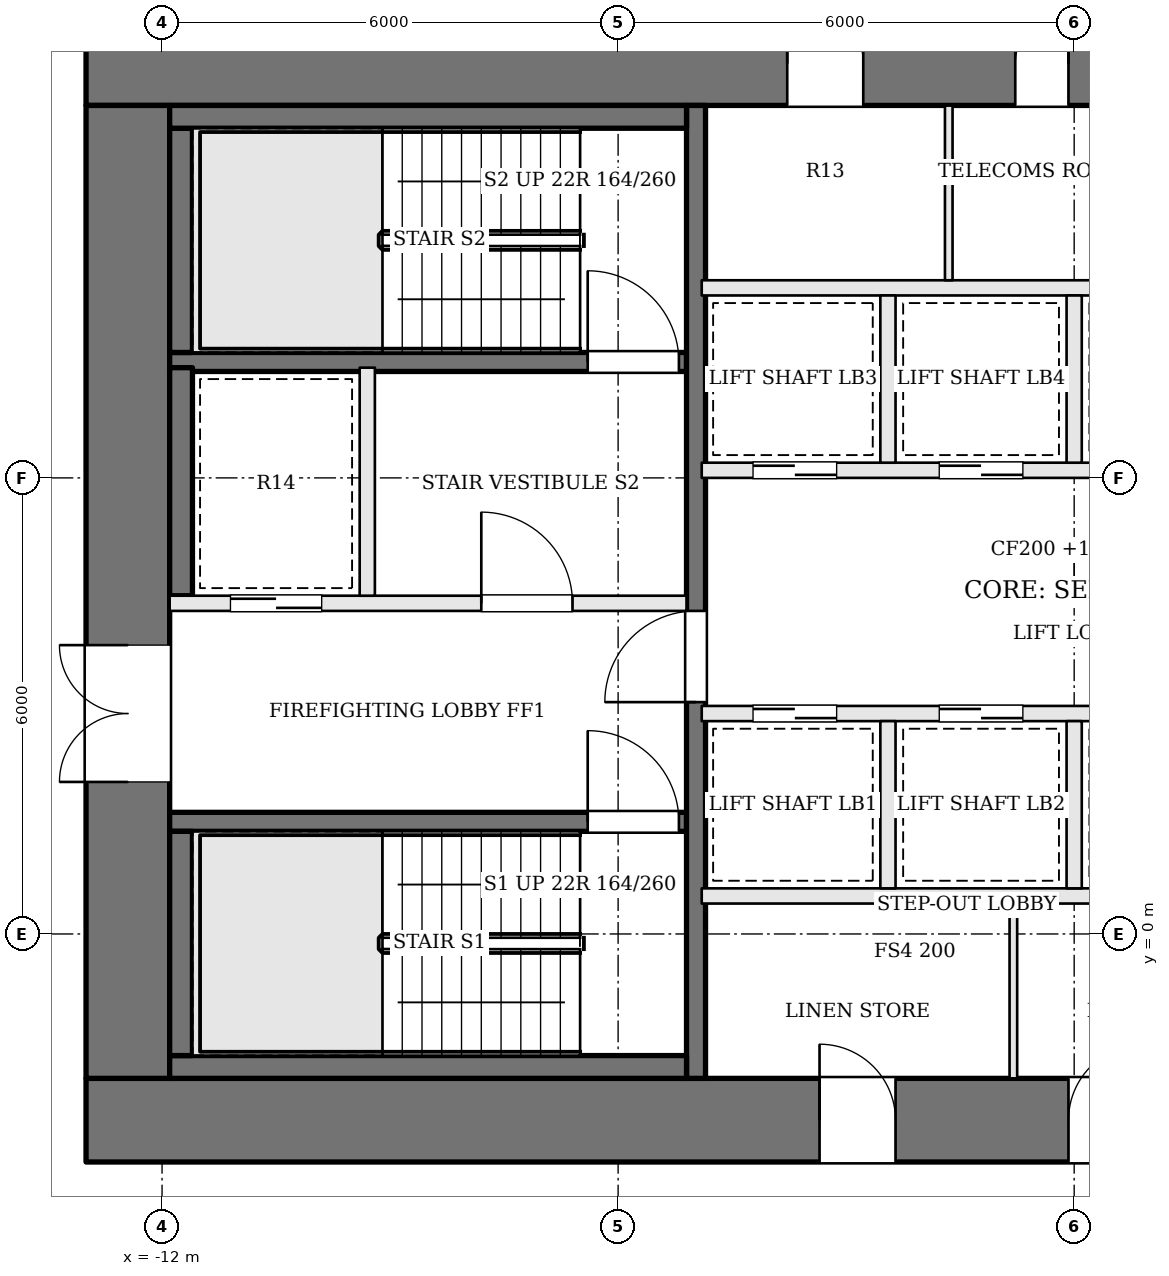
"""IFC4 building model, lengths in metres.
Left out: names, types, materials, properties, quantities, classifications, styles, units other than length and angle.
Written with IfcOpenShell. Run it as: python <this file> out.ifc"""

import sys

from ifc_helpers import new_model, si_unit, direction, frame, frame_2d, origin, place, context, subcontext, project, spatial, rectangle, extrude, element, fill, save


model = new_model("IFC4")
c1 = context("Model", 3, precision=1e-05, world=origin(), true_north=direction((0.0, 1.0)))
c2 = subcontext(c1, "Body", "Model", "MODEL_VIEW")
j1 = project(units=[si_unit("LENGTHUNIT", "METRE"), si_unit("PLANEANGLEUNIT", "RADIAN")], contexts=[c1])
p1 = place(None, origin())
s1 = spatial("IfcSite", under=j1, at=p1, CompositionType="ELEMENT")
p2 = place(p1, origin())
s2 = spatial("IfcBuilding", under=s1, at=p2, CompositionType="ELEMENT")
p3 = place(p2, frame((0.0, 0.0, 103.2)))
s3 = spatial("IfcBuildingStorey", under=s2, at=p3, CompositionType="ELEMENT", Elevation=103.2)
p4 = place(p3, frame((-13.0, 11.45, 0.0), z_axis=(0.0, 0.0, 1.0), x_axis=(1.0, 0.0, 0.0)))
e1 = element("IfcWall", 1, at=p4, inside=s3, PredefinedType="SHEAR", context=c2, shape_type="SweptSolid", body=[
    extrude(rectangle(XDim=26.0, YDim=1.1, at=frame_2d((13.0, 0.0))), origin(), (0.0, 0.0, 1.0), 3.6),
])
p5 = place(p4, frame((9.225, 0.0, 0.0)))
e2 = element("IfcOpeningElement", 2, at=p5, cuts=e1, PredefinedType="OPENING", context=c2, shape_type="SweptSolid", body=[
    extrude(rectangle(XDim=1.0, YDim=2.1, at=frame_2d((0.5, 1.05))), frame((0.0, 0.56, 0.0), z_axis=(0.0, -1.0, 0.0), x_axis=(1.0, 0.0, 0.0)), (0.0, 0.0, 1.0), 1.12),
])
p6 = place(p4, frame((12.225, 0.0, 0.0)))
e3 = element("IfcOpeningElement", 3, at=p6, cuts=e1, PredefinedType="OPENING", context=c2, shape_type="SweptSolid", body=[
    extrude(rectangle(XDim=0.7, YDim=2.1, at=frame_2d((0.35, 1.05))), frame((0.0, 0.56, 0.0), z_axis=(0.0, -1.0, 0.0), x_axis=(1.0, 0.0, 0.0)), (0.0, 0.0, 1.0), 1.12),
])
p7 = place(p4, frame((14.125, 0.0, 0.0)))
e4 = element("IfcOpeningElement", 4, at=p7, cuts=e1, PredefinedType="OPENING", context=c2, shape_type="SweptSolid", body=[
    extrude(rectangle(XDim=1.0, YDim=2.1, at=frame_2d((0.5, 1.05))), frame((0.0, 0.56, 0.0), z_axis=(0.0, -1.0, 0.0), x_axis=(1.0, 0.0, 0.0)), (0.0, 0.0, 1.0), 1.12),
])
p8 = place(p4, frame((15.65, 0.0, 0.0)))
e5 = element("IfcOpeningElement", 5, at=p8, cuts=e1, PredefinedType="OPENING", context=c2, shape_type="SweptSolid", body=[
    extrude(rectangle(XDim=1.0, YDim=2.1, at=frame_2d((0.5, 1.05))), frame((0.0, 0.56, 0.0), z_axis=(0.0, -1.0, 0.0), x_axis=(1.0, 0.0, 0.0)), (0.0, 0.0, 1.0), 1.12),
])
p9 = place(p3, frame((-13.0, -2.45, 0.0), z_axis=(0.0, 0.0, 1.0), x_axis=(1.0, 0.0, 0.0)))
e6 = element("IfcWall", 6, at=p9, inside=s3, PredefinedType="SHEAR", context=c2, shape_type="SweptSolid", body=[
    extrude(rectangle(XDim=26.0, YDim=1.1, at=frame_2d((13.0, 0.0))), origin(), (0.0, 0.0, 1.0), 3.6),
])
p10 = place(p9, frame((9.65, 0.0, 0.0)))
e7 = element("IfcOpeningElement", 7, at=p10, cuts=e6, PredefinedType="OPENING", context=c2, shape_type="SweptSolid", body=[
    extrude(rectangle(XDim=1.0, YDim=2.1, at=frame_2d((0.5, 1.05))), frame((0.0, 0.56, 0.0), z_axis=(0.0, -1.0, 0.0), x_axis=(1.0, 0.0, 0.0)), (0.0, 0.0, 1.0), 1.12),
])
p11 = place(p9, frame((12.925, 0.0, 0.0)))
e8 = element("IfcOpeningElement", 8, at=p11, cuts=e6, PredefinedType="OPENING", context=c2, shape_type="SweptSolid", body=[
    extrude(rectangle(XDim=1.0, YDim=2.1, at=frame_2d((0.5, 1.05))), frame((0.0, 0.56, 0.0), z_axis=(0.0, -1.0, 0.0), x_axis=(1.0, 0.0, 0.0)), (0.0, 0.0, 1.0), 1.12),
])
p12 = place(p9, frame((15.125, 0.0, 0.0)))
e9 = element("IfcOpeningElement", 9, at=p12, cuts=e6, PredefinedType="OPENING", context=c2, shape_type="SweptSolid", body=[
    extrude(rectangle(XDim=0.7, YDim=2.1, at=frame_2d((0.35, 1.05))), frame((0.0, 0.56, 0.0), z_axis=(0.0, -1.0, 0.0), x_axis=(1.0, 0.0, 0.0)), (0.0, 0.0, 1.0), 1.12),
])
p13 = place(p9, frame((16.5, 0.0, 0.0)))
e10 = element("IfcOpeningElement", 10, at=p13, cuts=e6, PredefinedType="OPENING", context=c2, shape_type="SweptSolid", body=[
    extrude(rectangle(XDim=1.0, YDim=2.1, at=frame_2d((0.5, 1.05))), frame((0.0, 0.56, 0.0), z_axis=(0.0, -1.0, 0.0), x_axis=(1.0, 0.0, 0.0)), (0.0, 0.0, 1.0), 1.12),
])
p14 = place(p3, frame((-12.45, -1.9, 0.0), z_axis=(0.0, 0.0, 1.0), x_axis=(0.0, 1.0, 0.0)))
e11 = element("IfcWall", 11, at=p14, inside=s3, PredefinedType="SHEAR", context=c2, shape_type="SweptSolid", body=[
    extrude(rectangle(XDim=12.8, YDim=1.1, at=frame_2d((6.4, 0.0))), origin(), (0.0, 0.0, 1.0), 3.6),
])
p15 = place(p14, frame((3.9, 0.0, 0.0)))
e12 = element("IfcOpeningElement", 12, at=p15, cuts=e11, PredefinedType="OPENING", context=c2, shape_type="SweptSolid", body=[
    extrude(rectangle(XDim=1.8, YDim=2.1, at=frame_2d((0.9, 1.05))), frame((0.0, 0.56, 0.0), z_axis=(0.0, -1.0, 0.0), x_axis=(1.0, 0.0, 0.0)), (0.0, 0.0, 1.0), 1.12),
])
p16 = place(p3, frame((-11.9, 1.475, 0.0), z_axis=(0.0, 0.0, 1.0), x_axis=(1.0, 0.0, 0.0)))
e13 = element("IfcWall", 13, at=p16, inside=s3, PredefinedType="SOLIDWALL", context=c2, shape_type="SweptSolid", body=[
    extrude(rectangle(XDim=6.8, YDim=0.25, at=frame_2d((3.4, 0.0))), origin(), (0.0, 0.0, 1.0), 3.4),
])
p17 = place(p16, frame((5.5, 0.0, 0.0)))
e14 = element("IfcOpeningElement", 14, at=p17, cuts=e13, PredefinedType="OPENING", context=c2, shape_type="SweptSolid", body=[
    extrude(rectangle(XDim=1.2, YDim=2.1, at=frame_2d((0.6, 1.05))), frame((0.0, 0.135, 0.0), z_axis=(0.0, -1.0, 0.0), x_axis=(1.0, 0.0, 0.0)), (0.0, 0.0, 1.0), 0.27),
])
p18 = place(p3, frame((-11.9, 4.35, 0.0), z_axis=(0.0, 0.0, 1.0), x_axis=(1.0, 0.0, 0.0)))
e15 = element("IfcWall", 15, at=p18, inside=s3, PredefinedType="SOLIDWALL", context=c2, shape_type="SweptSolid", body=[
    extrude(rectangle(XDim=6.8, YDim=0.2, at=frame_2d((3.4, 0.0))), origin(), (0.0, 0.0, 1.0), 3.4),
])
p19 = place(p18, frame((4.1, 0.0, 0.0)))
e16 = element("IfcOpeningElement", 16, at=p19, cuts=e15, PredefinedType="OPENING", context=c2, shape_type="SweptSolid", body=[
    extrude(rectangle(XDim=1.2, YDim=2.1, at=frame_2d((0.6, 1.05))), frame((0.0, 0.11, 0.0), z_axis=(0.0, -1.0, 0.0), x_axis=(1.0, 0.0, 0.0)), (0.0, 0.0, 1.0), 0.22),
])
p20 = place(p18, frame((0.8, 0.0, 0.0)))
e17 = element("IfcOpeningElement", 17, at=p20, cuts=e15, PredefinedType="OPENING", context=c2, shape_type="SweptSolid", body=[
    extrude(rectangle(XDim=1.2, YDim=2.1, at=frame_2d((0.6, 1.05))), frame((0.0, 0.11, 0.0), z_axis=(0.0, -1.0, 0.0), x_axis=(1.0, 0.0, 0.0)), (0.0, 0.0, 1.0), 0.22),
])
p21 = place(p3, frame((-11.9, 7.525, 0.0), z_axis=(0.0, 0.0, 1.0), x_axis=(1.0, 0.0, 0.0)))
e18 = element("IfcWall", 18, at=p21, inside=s3, PredefinedType="SOLIDWALL", context=c2, shape_type="SweptSolid", body=[
    extrude(rectangle(XDim=6.8, YDim=0.25, at=frame_2d((3.4, 0.0))), origin(), (0.0, 0.0, 1.0), 3.4),
])
p22 = place(p21, frame((5.5, 0.0, 0.0)))
e19 = element("IfcOpeningElement", 19, at=p22, cuts=e18, PredefinedType="OPENING", context=c2, shape_type="SweptSolid", body=[
    extrude(rectangle(XDim=1.2, YDim=2.1, at=frame_2d((0.6, 1.05))), frame((0.0, 0.135, 0.0), z_axis=(0.0, -1.0, 0.0), x_axis=(1.0, 0.0, 0.0)), (0.0, 0.0, 1.0), 0.27),
])
p23 = place(p3, frame((-9.3, 4.45, 0.0), z_axis=(0.0, 0.0, 1.0), x_axis=(0.0, 1.0, 0.0)))
e20 = element("IfcWall", 20, at=p23, inside=s3, PredefinedType="SOLIDWALL", context=c2, shape_type="SweptSolid", body=[
    extrude(rectangle(XDim=3.0, YDim=0.2, at=frame_2d((1.5, 0.0))), origin(), (0.0, 0.0, 1.0), 3.4),
])
p24 = place(p3, frame((-4.975, -1.9, 0.0), z_axis=(0.0, 0.0, 1.0), x_axis=(0.0, 1.0, 0.0)))
e21 = element("IfcWall", 21, at=p24, inside=s3, PredefinedType="SOLIDWALL", context=c2, shape_type="SweptSolid", body=[
    extrude(rectangle(XDim=12.8, YDim=0.25, at=frame_2d((6.4, 0.0))), origin(), (0.0, 0.0, 1.0), 3.4),
])
p25 = place(p24, frame((4.95, 0.0, 0.0)))
e22 = element("IfcOpeningElement", 22, at=p25, cuts=e21, PredefinedType="OPENING", context=c2, shape_type="SweptSolid", body=[
    extrude(rectangle(XDim=1.2, YDim=2.1, at=frame_2d((0.6, 1.05))), frame((0.0, 0.135, 0.0), z_axis=(0.0, -1.0, 0.0), x_axis=(1.0, 0.0, 0.0)), (0.0, 0.0, 1.0), 0.27),
])
p26 = place(p3, frame((-11.9, -1.75, 0.0), z_axis=(0.0, 0.0, 1.0), x_axis=(1.0, 0.0, 0.0)))
e23 = element("IfcWall", 23, at=p26, inside=s3, PredefinedType="SOLIDWALL", context=c2, shape_type="SweptSolid", body=[
    extrude(rectangle(XDim=6.8, YDim=0.3, at=frame_2d((3.4, 0.0))), origin(), (0.0, 0.0, 1.0), 3.4),
])
p27 = place(p3, frame((-11.75, -1.6, 0.0), z_axis=(0.0, 0.0, 1.0), x_axis=(0.0, 1.0, 0.0)))
e24 = element("IfcWall", 24, at=p27, inside=s3, PredefinedType="SOLIDWALL", context=c2, shape_type="SweptSolid", body=[
    extrude(rectangle(XDim=2.95, YDim=0.3, at=frame_2d((1.475, 0.0))), origin(), (0.0, 0.0, 1.0), 3.4),
])
p28 = place(p3, frame((-11.75, 4.45, 0.0), z_axis=(0.0, 0.0, 1.0), x_axis=(0.0, 1.0, 0.0)))
e25 = element("IfcWall", 25, at=p28, inside=s3, PredefinedType="SOLIDWALL", context=c2, shape_type="SweptSolid", body=[
    extrude(rectangle(XDim=3.0, YDim=0.3, at=frame_2d((1.5, 0.0))), origin(), (0.0, 0.0, 1.0), 3.4),
])
p29 = place(p3, frame((-11.75, 7.65, 0.0), z_axis=(0.0, 0.0, 1.0), x_axis=(0.0, 1.0, 0.0)))
e26 = element("IfcWall", 26, at=p29, inside=s3, PredefinedType="SOLIDWALL", context=c2, shape_type="SweptSolid", body=[
    extrude(rectangle(XDim=2.95, YDim=0.3, at=frame_2d((1.475, 0.0))), origin(), (0.0, 0.0, 1.0), 3.4),
])
p30 = place(p3, frame((-11.9, 10.75, 0.0), z_axis=(0.0, 0.0, 1.0), x_axis=(1.0, 0.0, 0.0)))
e27 = element("IfcWall", 27, at=p30, inside=s3, PredefinedType="SOLIDWALL", context=c2, shape_type="SweptSolid", body=[
    extrude(rectangle(XDim=6.8, YDim=0.3, at=frame_2d((3.4, 0.0))), origin(), (0.0, 0.0, 1.0), 3.4),
])
p31 = place(p3, frame((-4.9, 0.5, 0.0), z_axis=(0.0, 0.0, 1.0), x_axis=(1.0, 0.0, 0.0)))
e28 = element("IfcWall", 28, at=p31, inside=s3, PredefinedType="SOLIDWALL", context=c2, shape_type="SweptSolid", body=[
    extrude(rectangle(XDim=9.8, YDim=0.2, at=frame_2d((4.9, 0.0))), origin(), (0.0, 0.0, 1.0), 3.4),
])
p32 = place(p3, frame((-4.9, 2.9, 0.0), z_axis=(0.0, 0.0, 1.0), x_axis=(1.0, 0.0, 0.0)))
e29 = element("IfcWall", 29, at=p32, inside=s3, PredefinedType="SOLIDWALL", context=c2, shape_type="SweptSolid", body=[
    extrude(rectangle(XDim=9.8, YDim=0.2, at=frame_2d((4.9, 0.0))), origin(), (0.0, 0.0, 1.0), 3.4),
])
p33 = place(p32, frame((0.675, 0.0, 0.0)))
e30 = element("IfcOpeningElement", 30, at=p33, cuts=e29, PredefinedType="OPENING", context=c2, shape_type="SweptSolid", body=[
    extrude(rectangle(XDim=1.1, YDim=2.1, at=frame_2d((0.55, 1.05))), frame((0.0, 0.11, 0.0), z_axis=(0.0, -1.0, 0.0), x_axis=(1.0, 0.0, 0.0)), (0.0, 0.0, 1.0), 0.22),
])
p34 = place(p32, frame((3.125, 0.0, 0.0)))
e31 = element("IfcOpeningElement", 31, at=p34, cuts=e29, PredefinedType="OPENING", context=c2, shape_type="SweptSolid", body=[
    extrude(rectangle(XDim=1.1, YDim=2.1, at=frame_2d((0.55, 1.05))), frame((0.0, 0.11, 0.0), z_axis=(0.0, -1.0, 0.0), x_axis=(1.0, 0.0, 0.0)), (0.0, 0.0, 1.0), 0.22),
])
p35 = place(p3, frame((-4.9, 6.1, 0.0), z_axis=(0.0, 0.0, 1.0), x_axis=(1.0, 0.0, 0.0)))
e32 = element("IfcWall", 32, at=p35, inside=s3, PredefinedType="SOLIDWALL", context=c2, shape_type="SweptSolid", body=[
    extrude(rectangle(XDim=9.8, YDim=0.2, at=frame_2d((4.9, 0.0))), origin(), (0.0, 0.0, 1.0), 3.4),
])
p36 = place(p35, frame((0.675, 0.0, 0.0)))
e33 = element("IfcOpeningElement", 33, at=p36, cuts=e32, PredefinedType="OPENING", context=c2, shape_type="SweptSolid", body=[
    extrude(rectangle(XDim=1.1, YDim=2.1, at=frame_2d((0.55, 1.05))), frame((0.0, 0.11, 0.0), z_axis=(0.0, -1.0, 0.0), x_axis=(1.0, 0.0, 0.0)), (0.0, 0.0, 1.0), 0.22),
])
p37 = place(p35, frame((3.125, 0.0, 0.0)))
e34 = element("IfcOpeningElement", 34, at=p37, cuts=e32, PredefinedType="OPENING", context=c2, shape_type="SweptSolid", body=[
    extrude(rectangle(XDim=1.1, YDim=2.1, at=frame_2d((0.55, 1.05))), frame((0.0, 0.11, 0.0), z_axis=(0.0, -1.0, 0.0), x_axis=(1.0, 0.0, 0.0)), (0.0, 0.0, 1.0), 0.22),
])
p38 = place(p35, frame((5.575, 0.0, 0.0)))
e35 = element("IfcOpeningElement", 35, at=p38, cuts=e32, PredefinedType="OPENING", context=c2, shape_type="SweptSolid", body=[
    extrude(rectangle(XDim=1.1, YDim=2.1, at=frame_2d((0.55, 1.05))), frame((0.0, 0.11, 0.0), z_axis=(0.0, -1.0, 0.0), x_axis=(1.0, 0.0, 0.0)), (0.0, 0.0, 1.0), 0.22),
])
p39 = place(p35, frame((8.025, 0.0, 0.0)))
e36 = element("IfcOpeningElement", 36, at=p39, cuts=e32, PredefinedType="OPENING", context=c2, shape_type="SweptSolid", body=[
    extrude(rectangle(XDim=1.1, YDim=2.1, at=frame_2d((0.55, 1.05))), frame((0.0, 0.11, 0.0), z_axis=(0.0, -1.0, 0.0), x_axis=(1.0, 0.0, 0.0)), (0.0, 0.0, 1.0), 0.22),
])
p40 = place(p3, frame((-4.9, 8.5, 0.0), z_axis=(0.0, 0.0, 1.0), x_axis=(1.0, 0.0, 0.0)))
e37 = element("IfcWall", 37, at=p40, inside=s3, PredefinedType="SOLIDWALL", context=c2, shape_type="SweptSolid", body=[
    extrude(rectangle(XDim=9.8, YDim=0.2, at=frame_2d((4.9, 0.0))), origin(), (0.0, 0.0, 1.0), 3.4),
])
for number, where, z_axis, x_axis in (
    (38, (-2.45, 0.6, 0.0), (0.0, 0.0, 1.0), (0.0, 1.0, 0.0)),
    (39, (0.0, 0.6, 0.0), (0.0, 0.0, 1.0), (0.0, 1.0, 0.0)),
    (40, (-2.45, 6.2, 0.0), (0.0, 0.0, 1.0), (0.0, 1.0, 0.0)),
    (41, (0.0, 6.2, 0.0), (0.0, 0.0, 1.0), (0.0, 1.0, 0.0)),
):
    element("IfcWall", number, at=place(p3, frame(where, z_axis=z_axis, x_axis=x_axis)), inside=s3, PredefinedType="SOLIDWALL", context=c2, shape_type="SweptSolid", body=[
        extrude(rectangle(XDim=2.2, YDim=0.2, at=frame_2d((1.1, 0.0))), origin(), (0.0, 0.0, 1.0), 3.4),
    ])
for number, where, z_axis, x_axis in (
    (42, (-0.8, -1.9, 0.0), (0.0, 0.0, 1.0), (0.0, 1.0, 0.0)),
    (43, (-1.65, 8.6, 0.0), (0.0, 0.0, 1.0), (0.0, 1.0, 0.0)),
):
    element("IfcWall", number, at=place(p3, frame(where, z_axis=z_axis, x_axis=x_axis)), inside=s3, PredefinedType="PARTITIONING", context=c2, shape_type="SweptSolid", body=[
        extrude(rectangle(XDim=2.3, YDim=0.1, at=frame_2d((1.15, 0.0))), origin(), (0.0, 0.0, 1.0), 3.4),
    ])
p41 = place(p15, origin())
e44 = element("IfcDoor", 44, at=p41, inside=s3, OperationType="DOUBLE_DOOR_SINGLE_SWING", PredefinedType="DOOR", context=c2, shape_type="SweptSolid", body=[
    extrude(rectangle(XDim=1.8, YDim=2.1, at=frame_2d((0.9, 1.05))), frame((0.0, 0.025, 0.0), z_axis=(0.0, -1.0, 0.0), x_axis=(1.0, 0.0, 0.0)), (0.0, 0.0, 1.0), 0.05),
])
fill(e12, e44)
p42 = place(p25, origin())
e45 = element("IfcDoor", 45, at=p42, inside=s3, OperationType="SINGLE_SWING_LEFT", PredefinedType="DOOR", context=c2, shape_type="SweptSolid", body=[
    extrude(rectangle(XDim=1.2, YDim=2.1, at=frame_2d((0.6, 1.05))), frame((0.0, 0.025, 0.0), z_axis=(0.0, -1.0, 0.0), x_axis=(1.0, 0.0, 0.0)), (0.0, 0.0, 1.0), 0.05),
])
fill(e22, e45)
p43 = place(p19, origin())
e46 = element("IfcDoor", 46, at=p43, inside=s3, OperationType="SINGLE_SWING_LEFT", PredefinedType="DOOR", context=c2, shape_type="SweptSolid", body=[
    extrude(rectangle(XDim=1.2, YDim=2.1, at=frame_2d((0.6, 1.05))), frame((0.0, 0.025, 0.0), z_axis=(0.0, -1.0, 0.0), x_axis=(1.0, 0.0, 0.0)), (0.0, 0.0, 1.0), 0.05),
])
fill(e16, e46)
p44 = place(p17, origin())
e47 = element("IfcDoor", 47, at=p44, inside=s3, OperationType="SINGLE_SWING_LEFT", PredefinedType="DOOR", context=c2, shape_type="SweptSolid", body=[
    extrude(rectangle(XDim=1.2, YDim=2.1, at=frame_2d((0.6, 1.05))), frame((0.0, 0.025, 0.0), z_axis=(0.0, -1.0, 0.0), x_axis=(1.0, 0.0, 0.0)), (0.0, 0.0, 1.0), 0.05),
])
fill(e14, e47)
p45 = place(p22, origin())
e48 = element("IfcDoor", 48, at=p45, inside=s3, OperationType="SINGLE_SWING_LEFT", PredefinedType="DOOR", context=c2, shape_type="SweptSolid", body=[
    extrude(rectangle(XDim=1.2, YDim=2.1, at=frame_2d((0.6, 1.05))), frame((0.0, 0.025, 0.0), z_axis=(0.0, -1.0, 0.0), x_axis=(1.0, 0.0, 0.0)), (0.0, 0.0, 1.0), 0.05),
])
fill(e19, e48)
p46 = place(p20, origin())
e49 = element("IfcDoor", 49, at=p46, inside=s3, OperationType="SLIDING_TO_RIGHT", PredefinedType="DOOR", context=c2, shape_type="SweptSolid", body=[
    extrude(rectangle(XDim=1.2, YDim=2.1, at=frame_2d((0.6, 1.05))), frame((0.0, 0.025, 0.0), z_axis=(0.0, -1.0, 0.0), x_axis=(1.0, 0.0, 0.0)), (0.0, 0.0, 1.0), 0.05),
])
fill(e17, e49)
p47 = place(p33, origin())
e50 = element("IfcDoor", 50, at=p47, inside=s3, OperationType="SLIDING_TO_RIGHT", PredefinedType="DOOR", context=c2, shape_type="SweptSolid", body=[
    extrude(rectangle(XDim=1.1, YDim=2.1, at=frame_2d((0.55, 1.05))), frame((0.0, 0.025, 0.0), z_axis=(0.0, -1.0, 0.0), x_axis=(1.0, 0.0, 0.0)), (0.0, 0.0, 1.0), 0.05),
])
fill(e30, e50)
p48 = place(p34, origin())
e51 = element("IfcDoor", 51, at=p48, inside=s3, OperationType="SLIDING_TO_LEFT", PredefinedType="DOOR", context=c2, shape_type="SweptSolid", body=[
    extrude(rectangle(XDim=1.1, YDim=2.1, at=frame_2d((0.55, 1.05))), frame((0.0, 0.025, 0.0), z_axis=(0.0, -1.0, 0.0), x_axis=(1.0, 0.0, 0.0)), (0.0, 0.0, 1.0), 0.05),
])
fill(e31, e51)
p49 = place(p36, origin())
e52 = element("IfcDoor", 52, at=p49, inside=s3, OperationType="SLIDING_TO_RIGHT", PredefinedType="DOOR", context=c2, shape_type="SweptSolid", body=[
    extrude(rectangle(XDim=1.1, YDim=2.1, at=frame_2d((0.55, 1.05))), frame((0.0, 0.025, 0.0), z_axis=(0.0, -1.0, 0.0), x_axis=(1.0, 0.0, 0.0)), (0.0, 0.0, 1.0), 0.05),
])
fill(e33, e52)
p50 = place(p37, origin())
e53 = element("IfcDoor", 53, at=p50, inside=s3, OperationType="SLIDING_TO_LEFT", PredefinedType="DOOR", context=c2, shape_type="SweptSolid", body=[
    extrude(rectangle(XDim=1.1, YDim=2.1, at=frame_2d((0.55, 1.05))), frame((0.0, 0.025, 0.0), z_axis=(0.0, -1.0, 0.0), x_axis=(1.0, 0.0, 0.0)), (0.0, 0.0, 1.0), 0.05),
])
fill(e34, e53)
p51 = place(p10, origin())
e54 = element("IfcDoor", 54, at=p51, inside=s3, OperationType="SINGLE_SWING_LEFT", PredefinedType="DOOR", context=c2, shape_type="SweptSolid", body=[
    extrude(rectangle(XDim=1.0, YDim=2.1, at=frame_2d((0.5, 1.05))), frame((0.0, 0.025, 0.0), z_axis=(0.0, -1.0, 0.0), x_axis=(1.0, 0.0, 0.0)), (0.0, 0.0, 1.0), 0.05),
])
fill(e7, e54)
p52 = place(p11, origin())
e55 = element("IfcDoor", 55, at=p52, inside=s3, OperationType="SINGLE_SWING_RIGHT", PredefinedType="DOOR", context=c2, shape_type="SweptSolid", body=[
    extrude(rectangle(XDim=1.0, YDim=2.1, at=frame_2d((0.5, 1.05))), frame((0.0, 0.025, 0.0), z_axis=(0.0, -1.0, 0.0), x_axis=(1.0, 0.0, 0.0)), (0.0, 0.0, 1.0), 0.05),
])
fill(e8, e55)
p53 = place(p5, origin())
e56 = element("IfcDoor", 56, at=p53, inside=s3, OperationType="SINGLE_SWING_LEFT", PredefinedType="DOOR", context=c2, shape_type="SweptSolid", body=[
    extrude(rectangle(XDim=1.0, YDim=2.1, at=frame_2d((0.5, 1.05))), frame((0.0, 0.025, 0.0), z_axis=(0.0, -1.0, 0.0), x_axis=(1.0, 0.0, 0.0)), (0.0, 0.0, 1.0), 0.05),
])
fill(e2, e56)
p54 = place(p6, origin())
e57 = element("IfcDoor", 57, at=p54, inside=s3, OperationType="SINGLE_SWING_RIGHT", PredefinedType="DOOR", context=c2, shape_type="SweptSolid", body=[
    extrude(rectangle(XDim=0.7, YDim=2.1, at=frame_2d((0.35, 1.05))), frame((0.0, 0.025, 0.0), z_axis=(0.0, -1.0, 0.0), x_axis=(1.0, 0.0, 0.0)), (0.0, 0.0, 1.0), 0.05),
])
fill(e3, e57)
save(model, sys.argv[1])
